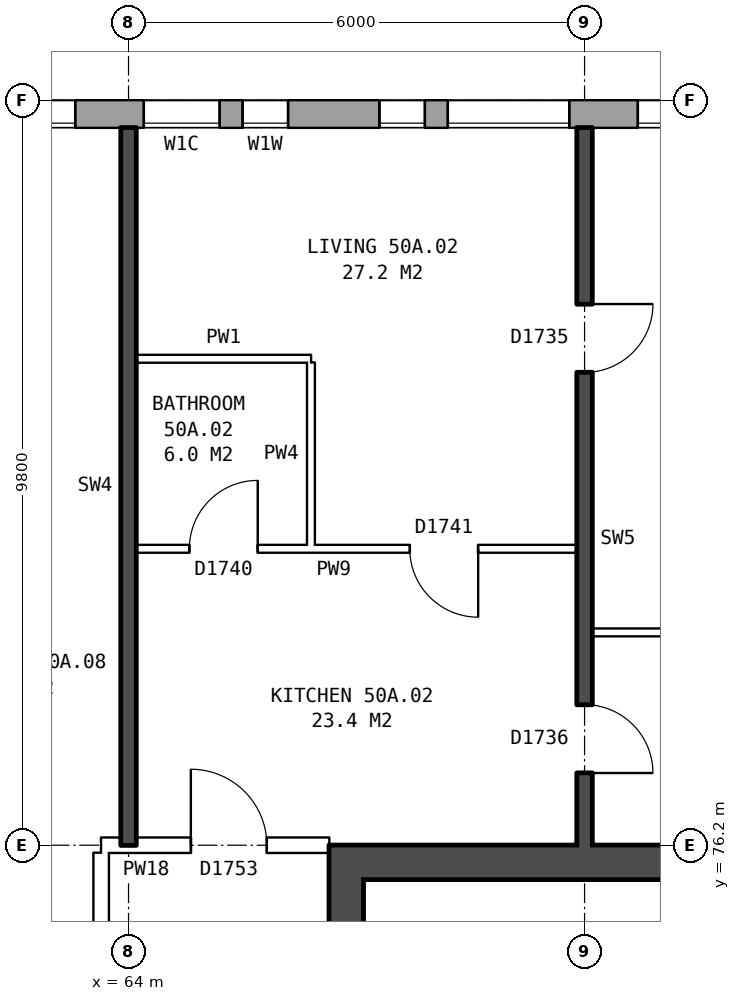
"""IFC4 building model, lengths in metres.
Left out: names, types, materials, properties, quantities, classifications, styles, units other than length and angle.
Written with IfcOpenShell. Run it as: python <this file> out.ifc"""

import sys

from ifc_helpers import new_model, si_unit, direction, frame, frame_2d, origin, place, context, subcontext, project, spatial, rectangle, extrude, element, fill, save


model = new_model("IFC4")
c1 = context("Model", 3, precision=1e-05, world=origin(), true_north=direction((0.0, 1.0)))
c2 = subcontext(c1, "Body", "Model", "MODEL_VIEW")
j1 = project(units=[si_unit("LENGTHUNIT", "METRE"), si_unit("PLANEANGLEUNIT", "RADIAN")], contexts=[c1])
p1 = place(None, origin())
s1 = spatial("IfcSite", under=j1, at=p1, CompositionType="ELEMENT")
p2 = place(p1, origin())
s2 = spatial("IfcBuilding", under=s1, at=p2, CompositionType="ELEMENT")
p3 = place(p2, frame((0.0, 0.0, 178.9)))
s3 = spatial("IfcBuildingStorey", under=s2, at=p3, CompositionType="ELEMENT", Elevation=178.9)
p4 = place(p3, frame((72.925, 85.82, 0.0), z_axis=(0.0, 0.0, 1.0), x_axis=(-1.0, 0.0, 0.0)))
e1 = element("IfcWall", 1, at=p4, inside=s3, PredefinedType="STANDARD", context=c2, shape_type="SweptSolid", body=[
    extrude(rectangle(XDim=39.601, YDim=0.36, at=frame_2d((19.8, 0.0))), origin(), (0.0, 0.0, 1.0), 2.85),
])
p5 = place(p4, frame((0.625, 0.0, 0.8)))
e2 = element("IfcOpeningElement", 2, at=p5, cuts=e1, PredefinedType="OPENING", context=c2, shape_type="SweptSolid", body=[
    extrude(rectangle(XDim=1.6, YDim=1.8, at=frame_2d((0.8, 0.9))), frame((0.0, 0.19, 0.0), z_axis=(0.0, -1.0, 0.0), x_axis=(1.0, 0.0, 0.0)), (0.0, 0.0, 1.0), 0.38),
])
p6 = place(p4, frame((3.125, 0.0, 0.8)))
e3 = element("IfcOpeningElement", 3, at=p6, cuts=e1, PredefinedType="OPENING", context=c2, shape_type="SweptSolid", body=[
    extrude(rectangle(XDim=1.6, YDim=1.8, at=frame_2d((0.8, 0.9))), frame((0.0, 0.19, 0.0), z_axis=(0.0, -1.0, 0.0), x_axis=(1.0, 0.0, 0.0)), (0.0, 0.0, 1.0), 0.38),
])
p7 = place(p4, frame((5.025, 0.0, 1.7)))
e4 = element("IfcOpeningElement", 4, at=p7, cuts=e1, PredefinedType="OPENING", context=c2, shape_type="SweptSolid", body=[
    extrude(rectangle(XDim=0.6, YDim=0.9, at=frame_2d((0.3, 0.45))), frame((0.0, 0.19, 0.0), z_axis=(0.0, -1.0, 0.0), x_axis=(1.0, 0.0, 0.0)), (0.0, 0.0, 1.0), 0.38),
])
p8 = place(p4, frame((9.625, 0.0, 0.8)))
e5 = element("IfcOpeningElement", 5, at=p8, cuts=e1, PredefinedType="OPENING", context=c2, shape_type="SweptSolid", body=[
    extrude(rectangle(XDim=1.6, YDim=1.8, at=frame_2d((0.8, 0.9))), frame((0.0, 0.19, 0.0), z_axis=(0.0, -1.0, 0.0), x_axis=(1.0, 0.0, 0.0)), (0.0, 0.0, 1.0), 0.38),
])
p9 = place(p4, frame((12.625, 0.0, 0.8)))
e6 = element("IfcOpeningElement", 6, at=p9, cuts=e1, PredefinedType="OPENING", context=c2, shape_type="SweptSolid", body=[
    extrude(rectangle(XDim=1.6, YDim=1.8, at=frame_2d((0.8, 0.9))), frame((0.0, 0.19, 0.0), z_axis=(0.0, -1.0, 0.0), x_axis=(1.0, 0.0, 0.0)), (0.0, 0.0, 1.0), 0.38),
])
p10 = place(p4, frame((15.625, 0.0, 0.8)))
e7 = element("IfcOpeningElement", 7, at=p10, cuts=e1, PredefinedType="OPENING", context=c2, shape_type="SweptSolid", body=[
    extrude(rectangle(XDim=1.6, YDim=1.8, at=frame_2d((0.8, 0.9))), frame((0.0, 0.19, 0.0), z_axis=(0.0, -1.0, 0.0), x_axis=(1.0, 0.0, 0.0)), (0.0, 0.0, 1.0), 0.38),
])
p11 = place(p4, frame((18.625, 0.0, 0.8)))
e8 = element("IfcOpeningElement", 8, at=p11, cuts=e1, PredefinedType="OPENING", context=c2, shape_type="SweptSolid", body=[
    extrude(rectangle(XDim=1.6, YDim=1.8, at=frame_2d((0.8, 0.9))), frame((0.0, 0.19, 0.0), z_axis=(0.0, -1.0, 0.0), x_axis=(1.0, 0.0, 0.0)), (0.0, 0.0, 1.0), 0.38),
])
p12 = place(p4, frame((21.625, 0.0, 0.8)))
e9 = element("IfcOpeningElement", 9, at=p12, cuts=e1, PredefinedType="OPENING", context=c2, shape_type="SweptSolid", body=[
    extrude(rectangle(XDim=1.6, YDim=1.8, at=frame_2d((0.8, 0.9))), frame((0.0, 0.19, 0.0), z_axis=(0.0, -1.0, 0.0), x_axis=(1.0, 0.0, 0.0)), (0.0, 0.0, 1.0), 0.38),
])
p13 = place(p4, frame((24.625, 0.0, 0.8)))
e10 = element("IfcOpeningElement", 10, at=p13, cuts=e1, PredefinedType="OPENING", context=c2, shape_type="SweptSolid", body=[
    extrude(rectangle(XDim=1.6, YDim=1.8, at=frame_2d((0.8, 0.9))), frame((0.0, 0.19, 0.0), z_axis=(0.0, -1.0, 0.0), x_axis=(1.0, 0.0, 0.0)), (0.0, 0.0, 1.0), 0.38),
])
p14 = place(p4, frame((27.625, 0.0, 0.8)))
e11 = element("IfcOpeningElement", 11, at=p14, cuts=e1, PredefinedType="OPENING", context=c2, shape_type="SweptSolid", body=[
    extrude(rectangle(XDim=1.6, YDim=1.8, at=frame_2d((0.8, 0.9))), frame((0.0, 0.19, 0.0), z_axis=(0.0, -1.0, 0.0), x_axis=(1.0, 0.0, 0.0)), (0.0, 0.0, 1.0), 0.38),
])
p15 = place(p4, frame((30.625, 0.0, 0.8)))
e12 = element("IfcOpeningElement", 12, at=p15, cuts=e1, PredefinedType="OPENING", context=c2, shape_type="SweptSolid", body=[
    extrude(rectangle(XDim=1.6, YDim=1.8, at=frame_2d((0.8, 0.9))), frame((0.0, 0.19, 0.0), z_axis=(0.0, -1.0, 0.0), x_axis=(1.0, 0.0, 0.0)), (0.0, 0.0, 1.0), 0.38),
])
p16 = place(p4, frame((33.925, 0.0, 1.7)))
e13 = element("IfcOpeningElement", 13, at=p16, cuts=e1, PredefinedType="OPENING", context=c2, shape_type="SweptSolid", body=[
    extrude(rectangle(XDim=0.6, YDim=0.9, at=frame_2d((0.3, 0.45))), frame((0.0, 0.19, 0.0), z_axis=(0.0, -1.0, 0.0), x_axis=(1.0, 0.0, 0.0)), (0.0, 0.0, 1.0), 0.38),
])
p17 = place(p4, frame((36.625, 0.0, 0.8)))
e14 = element("IfcOpeningElement", 14, at=p17, cuts=e1, PredefinedType="OPENING", context=c2, shape_type="SweptSolid", body=[
    extrude(rectangle(XDim=1.6, YDim=1.8, at=frame_2d((0.8, 0.9))), frame((0.0, 0.19, 0.0), z_axis=(0.0, -1.0, 0.0), x_axis=(1.0, 0.0, 0.0)), (0.0, 0.0, 1.0), 0.38),
])
p18 = place(p4, frame((6.825, 0.0, 0.8)))
e15 = element("IfcOpeningElement", 15, at=p18, cuts=e1, PredefinedType="OPENING", context=c2, shape_type="SweptSolid", body=[
    extrude(rectangle(XDim=0.6, YDim=0.9, at=frame_2d((0.3, 0.45))), frame((0.0, 0.19, 0.0), z_axis=(0.0, -1.0, 0.0), x_axis=(1.0, 0.0, 0.0)), (0.0, 0.0, 1.0), 0.38),
])
p19 = place(p4, frame((7.725, 0.0, 0.8)))
e16 = element("IfcOpeningElement", 16, at=p19, cuts=e1, PredefinedType="OPENING", context=c2, shape_type="SweptSolid", body=[
    extrude(rectangle(XDim=1.0, YDim=1.8, at=frame_2d((0.5, 0.9))), frame((0.0, 0.19, 0.0), z_axis=(0.0, -1.0, 0.0), x_axis=(1.0, 0.0, 0.0)), (0.0, 0.0, 1.0), 0.38),
])
p20 = place(p4, frame((34.825, 0.0, 0.8)))
e17 = element("IfcOpeningElement", 17, at=p20, cuts=e1, PredefinedType="OPENING", context=c2, shape_type="SweptSolid", body=[
    extrude(rectangle(XDim=1.4, YDim=1.8, at=frame_2d((0.7, 0.9))), frame((0.0, 0.19, 0.0), z_axis=(0.0, -1.0, 0.0), x_axis=(1.0, 0.0, 0.0)), (0.0, 0.0, 1.0), 0.38),
])
p21 = place(p3, frame((66.865, 63.8, 0.0), z_axis=(0.0, 0.0, 1.0), x_axis=(0.0, 1.0, 0.0)))
e18 = element("IfcWall", 18, at=p21, inside=s3, PredefinedType="SHEAR", context=c2, shape_type="SweptSolid", body=[
    extrude(rectangle(XDim=12.4, YDim=0.45, at=frame_2d((6.2, 0.0))), origin(), (0.0, 0.0, 1.0), 2.85),
])
p22 = place(p21, frame((1.325, 0.0, 0.0)))
e19 = element("IfcOpeningElement", 19, at=p22, cuts=e18, PredefinedType="OPENING", context=c2, shape_type="SweptSolid", body=[
    extrude(rectangle(XDim=1.1, YDim=2.1, at=frame_2d((0.55, 1.05))), frame((0.0, 0.235, 0.0), z_axis=(0.0, -1.0, 0.0), x_axis=(1.0, 0.0, 0.0)), (0.0, 0.0, 1.0), 0.47),
])
p23 = place(p21, frame((3.6, 0.0, 0.0)))
e20 = element("IfcOpeningElement", 20, at=p23, cuts=e18, PredefinedType="OPENING", context=c2, shape_type="SweptSolid", body=[
    extrude(rectangle(XDim=1.1, YDim=2.1, at=frame_2d((0.55, 1.05))), frame((0.0, 0.235, 0.0), z_axis=(0.0, -1.0, 0.0), x_axis=(1.0, 0.0, 0.0)), (0.0, 0.0, 1.0), 0.47),
])
p24 = place(p21, frame((5.8, 0.0, 0.0)))
e21 = element("IfcOpeningElement", 21, at=p24, cuts=e18, PredefinedType="OPENING", context=c2, shape_type="SweptSolid", body=[
    extrude(rectangle(XDim=1.1, YDim=2.1, at=frame_2d((0.55, 1.05))), frame((0.0, 0.235, 0.0), z_axis=(0.0, -1.0, 0.0), x_axis=(1.0, 0.0, 0.0)), (0.0, 0.0, 1.0), 0.47),
])
p25 = place(p21, frame((8.0, 0.0, 0.0)))
e22 = element("IfcOpeningElement", 22, at=p25, cuts=e18, PredefinedType="OPENING", context=c2, shape_type="SweptSolid", body=[
    extrude(rectangle(XDim=1.1, YDim=2.1, at=frame_2d((0.55, 1.05))), frame((0.0, 0.235, 0.0), z_axis=(0.0, -1.0, 0.0), x_axis=(1.0, 0.0, 0.0)), (0.0, 0.0, 1.0), 0.47),
])
p26 = place(p21, frame((9.9, 0.0, 0.0)))
e23 = element("IfcOpeningElement", 23, at=p26, cuts=e18, PredefinedType="OPENING", context=c2, shape_type="SweptSolid", body=[
    extrude(rectangle(XDim=1.1, YDim=2.1, at=frame_2d((0.55, 1.05))), frame((0.0, 0.235, 0.0), z_axis=(0.0, -1.0, 0.0), x_axis=(1.0, 0.0, 0.0)), (0.0, 0.0, 1.0), 0.47),
])
p27 = place(p3, frame((67.09, 75.975, 0.0), z_axis=(0.0, 0.0, 1.0), x_axis=(1.0, 0.0, 0.0)))
e24 = element("IfcWall", 24, at=p27, inside=s3, PredefinedType="SHEAR", context=c2, shape_type="SweptSolid", body=[
    extrude(rectangle(XDim=8.1, YDim=0.45, at=frame_2d((4.05, 0.0))), origin(), (0.0, 0.0, 1.0), 2.85),
])
p28 = place(p3, frame((63.64, 63.9, 0.0), z_axis=(0.0, 0.0, 1.0), x_axis=(0.0, 1.0, 0.0)))
e25 = element("IfcWall", 25, at=p28, inside=s3, PredefinedType="PARTITIONING", context=c2, shape_type="SweptSolid", body=[
    extrude(rectangle(XDim=12.2, YDim=0.2, at=frame_2d((6.1, 0.0))), origin(), (0.0, 0.0, 1.0), 2.85),
])
p29 = place(p28, frame((5.1, 0.0, 0.0)))
e26 = element("IfcOpeningElement", 26, at=p29, cuts=e25, PredefinedType="OPENING", context=c2, shape_type="SweptSolid", body=[
    extrude(rectangle(XDim=2.0, YDim=2.1, at=frame_2d((1.0, 1.05))), frame((0.0, 0.11, 0.0), z_axis=(0.0, -1.0, 0.0), x_axis=(1.0, 0.0, 0.0)), (0.0, 0.0, 1.0), 0.22),
])
p30 = place(p3, frame((63.64, 76.2, 0.0), z_axis=(0.0, 0.0, 1.0), x_axis=(1.0, 0.0, 0.0)))
e27 = element("IfcWall", 27, at=p30, inside=s3, PredefinedType="PARTITIONING", context=c2, shape_type="SweptSolid", body=[
    extrude(rectangle(XDim=3.0, YDim=0.2, at=frame_2d((1.5, 0.0))), origin(), (0.0, 0.0, 1.0), 2.85),
])
p31 = place(p30, frame((1.18, 0.0, 0.0)))
e28 = element("IfcOpeningElement", 28, at=p31, cuts=e27, PredefinedType="OPENING", context=c2, shape_type="SweptSolid", body=[
    extrude(rectangle(XDim=1.0, YDim=2.1, at=frame_2d((0.5, 1.05))), frame((0.0, 0.11, 0.0), z_axis=(0.0, -1.0, 0.0), x_axis=(1.0, 0.0, 0.0)), (0.0, 0.0, 1.0), 0.22),
])
p32 = place(p3, frame((70.1, 79.0, 0.0), z_axis=(0.0, 0.0, 1.0), x_axis=(1.0, 0.0, 0.0)))
e29 = element("IfcWall", 29, at=p32, inside=s3, PredefinedType="PARTITIONING", context=c2, shape_type="SweptSolid", body=[
    extrude(rectangle(XDim=5.54, YDim=0.1, at=frame_2d((2.77, 0.0))), origin(), (0.0, 0.0, 1.0), 2.85),
])
p33 = place(p3, frame((64.1, 80.1, 0.0), z_axis=(0.0, 0.0, 1.0), x_axis=(1.0, 0.0, 0.0)))
e30 = element("IfcWall", 30, at=p33, inside=s3, PredefinedType="PARTITIONING", context=c2, shape_type="SweptSolid", body=[
    extrude(rectangle(XDim=5.8, YDim=0.1, at=frame_2d((2.9, 0.0))), origin(), (0.0, 0.0, 1.0), 2.85),
])
p34 = place(p33, frame((3.6, 0.0, 0.0)))
e31 = element("IfcOpeningElement", 31, at=p34, cuts=e30, PredefinedType="OPENING", context=c2, shape_type="SweptSolid", body=[
    extrude(rectangle(XDim=0.9, YDim=2.1, at=frame_2d((0.45, 1.05))), frame((0.0, 0.06, 0.0), z_axis=(0.0, -1.0, 0.0), x_axis=(1.0, 0.0, 0.0)), (0.0, 0.0, 1.0), 0.12),
])
p35 = place(p33, frame((0.7, 0.0, 0.0)))
e32 = element("IfcOpeningElement", 32, at=p35, cuts=e30, PredefinedType="OPENING", context=c2, shape_type="SweptSolid", body=[
    extrude(rectangle(XDim=0.9, YDim=2.1, at=frame_2d((0.45, 1.05))), frame((0.0, 0.06, 0.0), z_axis=(0.0, -1.0, 0.0), x_axis=(1.0, 0.0, 0.0)), (0.0, 0.0, 1.0), 0.12),
])
p36 = place(p3, frame((64.1, 82.6, 0.0), z_axis=(0.0, 0.0, 1.0), x_axis=(1.0, 0.0, 0.0)))
e33 = element("IfcWall", 33, at=p36, inside=s3, PredefinedType="PARTITIONING", context=c2, shape_type="SweptSolid", body=[
    extrude(rectangle(XDim=2.3, YDim=0.1, at=frame_2d((1.15, 0.0))), origin(), (0.0, 0.0, 1.0), 2.85),
])
p37 = place(p3, frame((64.0, 76.2, 0.0), z_axis=(0.0, 0.0, 1.0), x_axis=(0.0, 1.0, 0.0)))
e34 = element("IfcWall", 34, at=p37, inside=s3, PredefinedType="SOLIDWALL", context=c2, shape_type="SweptSolid", body=[
    extrude(rectangle(XDim=9.44, YDim=0.2, at=frame_2d((4.72, 0.0))), origin(), (0.0, 0.0, 1.0), 2.85),
])
p38 = place(p3, frame((66.4, 80.15, 0.0), z_axis=(0.0, 0.0, 1.0), x_axis=(0.0, 1.0, 0.0)))
e35 = element("IfcWall", 35, at=p38, inside=s3, PredefinedType="PARTITIONING", context=c2, shape_type="SweptSolid", body=[
    extrude(rectangle(XDim=2.4, YDim=0.1, at=frame_2d((1.2, 0.0))), origin(), (0.0, 0.0, 1.0), 2.85),
])
p39 = place(p3, frame((70.0, 76.2, 0.0), z_axis=(0.0, 0.0, 1.0), x_axis=(0.0, 1.0, 0.0)))
e36 = element("IfcWall", 36, at=p39, inside=s3, PredefinedType="SOLIDWALL", context=c2, shape_type="SweptSolid", body=[
    extrude(rectangle(XDim=9.44, YDim=0.2, at=frame_2d((4.72, 0.0))), origin(), (0.0, 0.0, 1.0), 2.85),
])
p40 = place(p39, frame((6.22, 0.0, 0.0)))
e37 = element("IfcOpeningElement", 37, at=p40, cuts=e36, PredefinedType="OPENING", context=c2, shape_type="SweptSolid", body=[
    extrude(rectangle(XDim=0.9, YDim=2.1, at=frame_2d((0.45, 1.05))), frame((0.0, 0.11, 0.0), z_axis=(0.0, -1.0, 0.0), x_axis=(1.0, 0.0, 0.0)), (0.0, 0.0, 1.0), 0.22),
])
p41 = place(p39, frame((0.95, 0.0, 0.0)))
e38 = element("IfcOpeningElement", 38, at=p41, cuts=e36, PredefinedType="OPENING", context=c2, shape_type="SweptSolid", body=[
    extrude(rectangle(XDim=0.9, YDim=2.1, at=frame_2d((0.45, 1.05))), frame((0.0, 0.11, 0.0), z_axis=(0.0, -1.0, 0.0), x_axis=(1.0, 0.0, 0.0)), (0.0, 0.0, 1.0), 0.22),
])
p42 = place(p5, origin())
e39 = element("IfcWindow", 39, at=p42, inside=s3, PartitioningType="SINGLE_PANEL", PredefinedType="WINDOW", context=c2, shape_type="SweptSolid", body=[
    extrude(rectangle(XDim=1.6, YDim=1.8, at=frame_2d((0.8, 0.9))), frame((0.0, 0.15, 0.0), z_axis=(0.0, -1.0, 0.0), x_axis=(1.0, 0.0, 0.0)), (0.0, 0.0, 1.0), 0.06),
])
fill(e2, e39)
p43 = place(p6, origin())
e40 = element("IfcWindow", 40, at=p43, inside=s3, PartitioningType="SINGLE_PANEL", PredefinedType="WINDOW", context=c2, shape_type="SweptSolid", body=[
    extrude(rectangle(XDim=1.6, YDim=1.8, at=frame_2d((0.8, 0.9))), frame((0.0, 0.15, 0.0), z_axis=(0.0, -1.0, 0.0), x_axis=(1.0, 0.0, 0.0)), (0.0, 0.0, 1.0), 0.06),
])
fill(e3, e40)
p44 = place(p7, origin())
e41 = element("IfcWindow", 41, at=p44, inside=s3, PartitioningType="SINGLE_PANEL", PredefinedType="WINDOW", context=c2, shape_type="SweptSolid", body=[
    extrude(rectangle(XDim=0.6, YDim=0.9, at=frame_2d((0.3, 0.45))), frame((0.0, 0.15, 0.0), z_axis=(0.0, -1.0, 0.0), x_axis=(1.0, 0.0, 0.0)), (0.0, 0.0, 1.0), 0.06),
])
fill(e4, e41)
p45 = place(p8, origin())
e42 = element("IfcWindow", 42, at=p45, inside=s3, PartitioningType="SINGLE_PANEL", PredefinedType="WINDOW", context=c2, shape_type="SweptSolid", body=[
    extrude(rectangle(XDim=1.6, YDim=1.8, at=frame_2d((0.8, 0.9))), frame((0.0, 0.15, 0.0), z_axis=(0.0, -1.0, 0.0), x_axis=(1.0, 0.0, 0.0)), (0.0, 0.0, 1.0), 0.06),
])
fill(e5, e42)
p46 = place(p40, frame((0.9, 0.0, 0.0), z_axis=(0.0, 0.0, 1.0), x_axis=(-1.0, 0.0, 0.0)))
e43 = element("IfcDoor", 43, at=p46, inside=s3, OperationType="SINGLE_SWING_LEFT", PredefinedType="DOOR", context=c2, shape_type="SweptSolid", body=[
    extrude(rectangle(XDim=0.9, YDim=2.1, at=frame_2d((0.45, 1.05))), frame((0.0, 0.025, 0.0), z_axis=(0.0, -1.0, 0.0), x_axis=(1.0, 0.0, 0.0)), (0.0, 0.0, 1.0), 0.05),
])
fill(e37, e43)
p47 = place(p41, frame((0.9, 0.0, 0.0), z_axis=(0.0, 0.0, 1.0), x_axis=(-1.0, 0.0, 0.0)))
e44 = element("IfcDoor", 44, at=p47, inside=s3, OperationType="SINGLE_SWING_RIGHT", PredefinedType="DOOR", context=c2, shape_type="SweptSolid", body=[
    extrude(rectangle(XDim=0.9, YDim=2.1, at=frame_2d((0.45, 1.05))), frame((0.0, 0.025, 0.0), z_axis=(0.0, -1.0, 0.0), x_axis=(1.0, 0.0, 0.0)), (0.0, 0.0, 1.0), 0.05),
])
fill(e38, e44)
p48 = place(p31, origin())
e45 = element("IfcDoor", 45, at=p48, inside=s3, OperationType="SINGLE_SWING_LEFT", PredefinedType="DOOR", context=c2, shape_type="SweptSolid", body=[
    extrude(rectangle(XDim=1.0, YDim=2.1, at=frame_2d((0.5, 1.05))), frame((0.0, 0.025, 0.0), z_axis=(0.0, -1.0, 0.0), x_axis=(1.0, 0.0, 0.0)), (0.0, 0.0, 1.0), 0.05),
])
fill(e28, e45)
p49 = place(p34, frame((0.9, 0.0, 0.0), z_axis=(0.0, 0.0, 1.0), x_axis=(-1.0, 0.0, 0.0)))
e46 = element("IfcDoor", 46, at=p49, inside=s3, OperationType="SINGLE_SWING_LEFT", PredefinedType="DOOR", context=c2, shape_type="SweptSolid", body=[
    extrude(rectangle(XDim=0.9, YDim=2.1, at=frame_2d((0.45, 1.05))), frame((0.0, 0.025, 0.0), z_axis=(0.0, -1.0, 0.0), x_axis=(1.0, 0.0, 0.0)), (0.0, 0.0, 1.0), 0.05),
])
fill(e31, e46)
p50 = place(p35, origin())
e47 = element("IfcDoor", 47, at=p50, inside=s3, OperationType="SINGLE_SWING_RIGHT", PredefinedType="DOOR", context=c2, shape_type="SweptSolid", body=[
    extrude(rectangle(XDim=0.9, YDim=2.1, at=frame_2d((0.45, 1.05))), frame((0.0, 0.025, 0.0), z_axis=(0.0, -1.0, 0.0), x_axis=(1.0, 0.0, 0.0)), (0.0, 0.0, 1.0), 0.05),
])
fill(e32, e47)
p51 = place(p18, origin())
e48 = element("IfcWindow", 48, at=p51, inside=s3, PartitioningType="SINGLE_PANEL", PredefinedType="WINDOW", context=c2, shape_type="SweptSolid", body=[
    extrude(rectangle(XDim=0.6, YDim=0.9, at=frame_2d((0.3, 0.45))), frame((0.0, 0.15, 0.0), z_axis=(0.0, -1.0, 0.0), x_axis=(1.0, 0.0, 0.0)), (0.0, 0.0, 1.0), 0.06),
])
fill(e15, e48)
p52 = place(p19, origin())
e49 = element("IfcWindow", 49, at=p52, inside=s3, PartitioningType="SINGLE_PANEL", PredefinedType="WINDOW", context=c2, shape_type="SweptSolid", body=[
    extrude(rectangle(XDim=1.0, YDim=1.8, at=frame_2d((0.5, 0.9))), frame((0.0, 0.15, 0.0), z_axis=(0.0, -1.0, 0.0), x_axis=(1.0, 0.0, 0.0)), (0.0, 0.0, 1.0), 0.06),
])
fill(e16, e49)
save(model, sys.argv[1])
